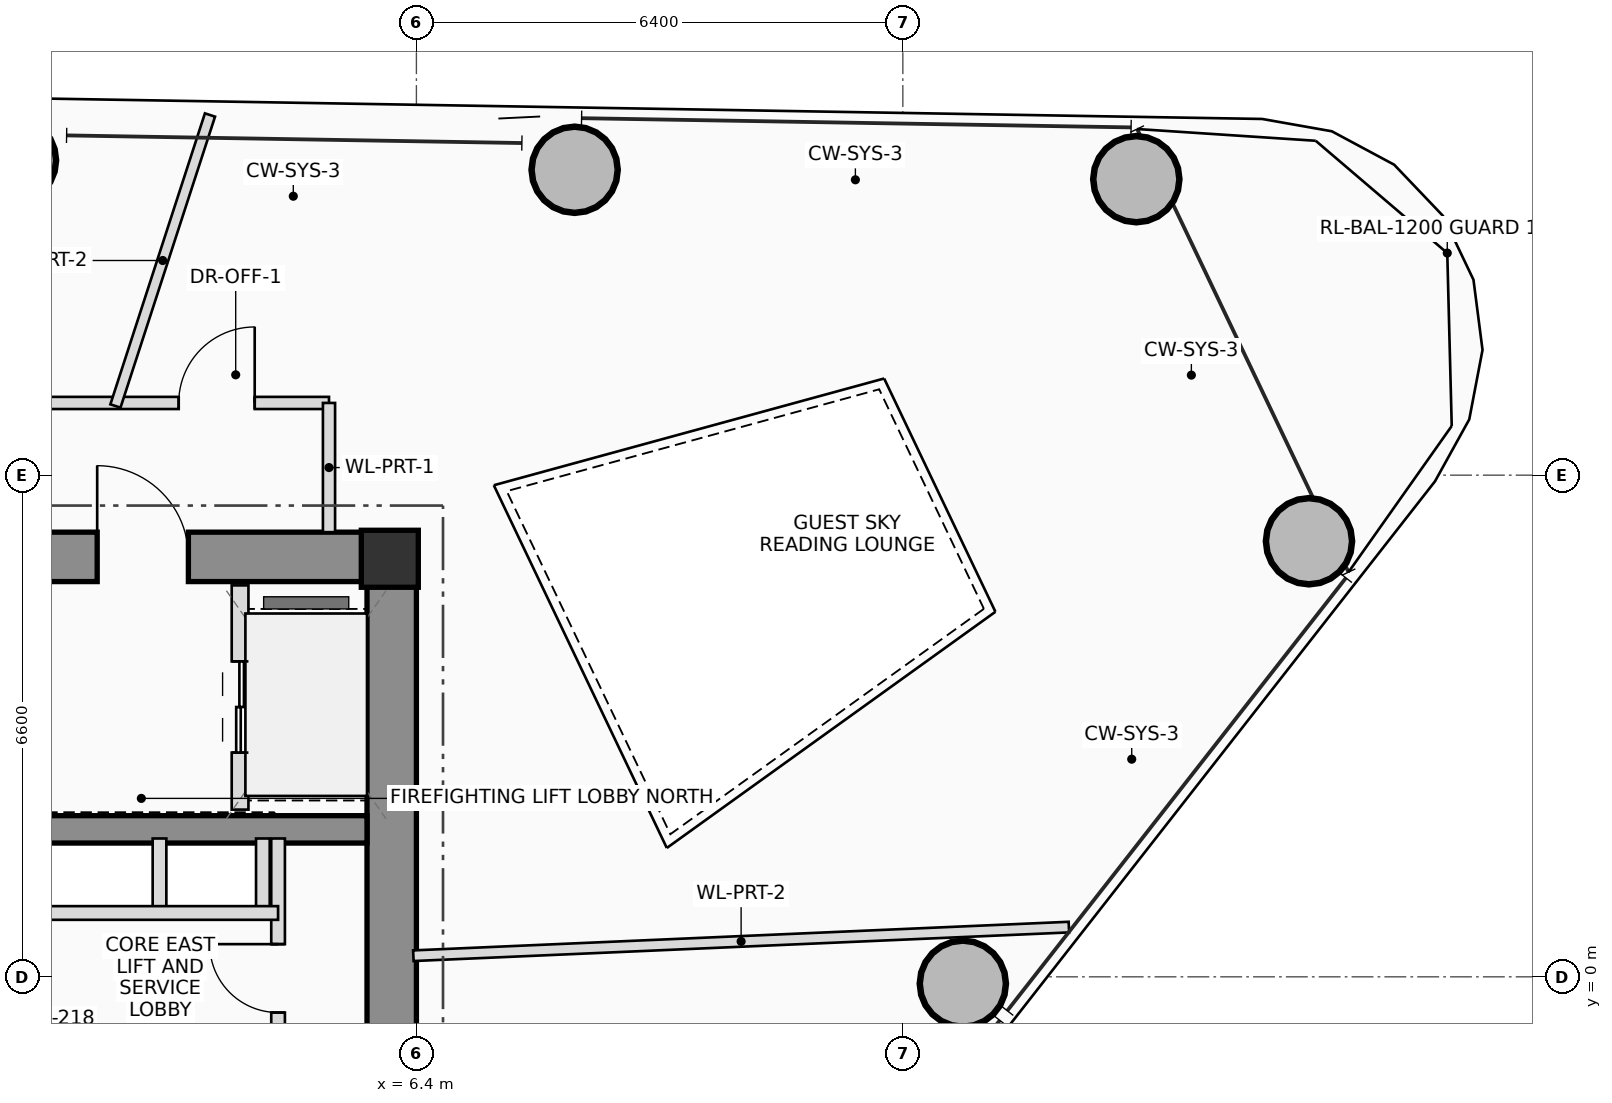
"""IFC4 building model, lengths in metres.
Left out: names, types, materials, properties, quantities, classifications, styles, units other than length and angle.
Written with IfcOpenShell. Run it as: python <this file> out.ifc"""

import sys

from ifc_helpers import new_model, si_unit, direction, frame, frame_2d, origin, origin_2d, place, context, subcontext, project, spatial, rectangle, hollow_circle, extrude, source, transform, mapped, element, fill, save


model = new_model("IFC4")
c1 = context("Model", 3, precision=1e-05, world=origin(), true_north=direction((0.0, 1.0)))
c2 = subcontext(c1, "Body", "Model", "MODEL_VIEW")
j1 = project(units=[si_unit("LENGTHUNIT", "METRE"), si_unit("PLANEANGLEUNIT", "RADIAN")], contexts=[c1])
p1 = place(None, origin())
s1 = spatial("IfcSite", under=j1, at=p1, CompositionType="ELEMENT")
p2 = place(p1, origin())
s2 = spatial("IfcBuilding", under=s1, at=p2, CompositionType="ELEMENT")
p3 = place(p2, frame((0.0, 0.0, 201.8)))
s3 = spatial("IfcBuildingStorey", under=s2, at=p3, CompositionType="ELEMENT", Elevation=201.8)
m1 = source(origin(), c2, "Body", "SweptSolid", [
    extrude(rectangle(XDim=0.75, YDim=0.75, at=origin_2d()), origin(), (0.0, 0.0, 1.0), 3.45),
])
p4 = place(p3, frame((6.05, 5.5, 0.0), z_axis=(0.0, 0.0, 1.0), x_axis=(1.0, 0.0, 0.0)))
e1 = element("IfcColumn", 1, at=p4, inside=s3, PredefinedType="COLUMN", context=c2, shape_type="MappedRepresentation", body=[
    mapped(m1, transform((0.0, 0.0, 0.0), scale=1.0)),
])
p5 = place(p3, frame((-6.4, 5.525, 0.0), z_axis=(0.0, 0.0, 1.0), x_axis=(1.0, 0.0, 0.0)))
e2 = element("IfcWall", 2, at=p5, inside=s3, PredefinedType="SHEAR", context=c2, shape_type="SweptSolid", body=[
    extrude(rectangle(XDim=12.8, YDim=0.65, at=frame_2d((6.4, 0.0))), origin(), (0.0, 0.0, 1.0), 3.45),
])
p6 = place(p5, frame((8.6, 0.0, 0.0)))
e3 = element("IfcOpeningElement", 3, at=p6, cuts=e2, PredefinedType="OPENING", context=c2, shape_type="SweptSolid", body=[
    extrude(rectangle(XDim=1.2, YDim=2.2, at=frame_2d((0.6, 1.1))), frame((0.0, 0.335, 0.0), z_axis=(0.0, -1.0, 0.0), x_axis=(1.0, 0.0, 0.0)), (0.0, 0.0, 1.0), 0.67),
])
p7 = place(p3, frame((6.075, -5.2, 0.0), z_axis=(0.0, 0.0, 1.0), x_axis=(0.0, 1.0, 0.0)))
e4 = element("IfcWall", 4, at=p7, inside=s3, PredefinedType="SHEAR", context=c2, shape_type="SweptSolid", body=[
    extrude(rectangle(XDim=10.4, YDim=0.65, at=frame_2d((5.2, 0.0))), origin(), (0.0, 0.0, 1.0), 3.45),
])
p8 = place(p3, frame((-5.75, 1.94, 0.0), z_axis=(0.0, 0.0, 1.0), x_axis=(1.0, 0.0, 0.0)))
e5 = element("IfcWall", 5, at=p8, inside=s3, PredefinedType="SHEAR", context=c2, shape_type="SweptSolid", body=[
    extrude(rectangle(XDim=11.5, YDim=0.36, at=frame_2d((5.75, 0.0))), origin(), (0.0, 0.0, 1.0), 3.45),
])
m2 = source(origin(), c2, "Body", "SweptSolid", [
    extrude(hollow_circle(Radius=0.575, WallThickness=0.042, at=origin_2d()), origin(), (0.0, 0.0, 1.0), 3.45),
])
for number, where, z_axis, x_axis in (
    (6, (13.59, -0.09, 0.0), (0.0, 0.0, 1.0), (1.0, 0.0, 0.0)),
    (7, (18.144, 5.731, 0.0), (0.0, 0.0, 1.0), (1.0, 0.0, 0.0)),
    (8, (15.872, 10.494, 0.0), (0.0, 0.0, 1.0), (1.0, 0.0, 0.0)),
    (9, (8.482, 10.618, 0.0), (0.0, 0.0, 1.0), (1.0, 0.0, 0.0)),
    (10, (1.092, 10.742, 0.0), (0.0, 0.0, 1.0), (1.0, 0.0, 0.0)),
):
    element("IfcColumn", number, at=place(p3, frame(where, z_axis=z_axis, x_axis=x_axis)), inside=s3, PredefinedType="COLUMN", context=c2, shape_type="MappedRepresentation", body=[
        mapped(m2, transform((0.0, 0.0, 0.0), scale=1.0)),
    ])
p9 = place(p3, frame((4.08, 2.2, 0.0), z_axis=(0.0, 0.0, 1.0), x_axis=(0.0, 1.0, 0.0)))
e11 = element("IfcWall", 11, at=p9, inside=s3, PredefinedType="PLUMBINGWALL", context=c2, shape_type="SweptSolid", body=[
    extrude(rectangle(XDim=2.95, YDim=0.22, at=frame_2d((1.475, 0.0))), origin(), (0.0, 0.0, 1.0), 3.25),
])
p10 = place(p9, frame((0.75, 0.0, 0.0)))
e12 = element("IfcOpeningElement", 12, at=p10, cuts=e11, PredefinedType="OPENING", context=c2, shape_type="SweptSolid", body=[
    extrude(rectangle(XDim=1.2, YDim=2.25, at=frame_2d((0.6, 1.125))), frame((0.0, 0.12, 0.0), z_axis=(0.0, -1.0, 0.0), x_axis=(1.0, 0.0, 0.0)), (0.0, 0.0, 1.0), 0.24),
])
for number, where, z_axis, x_axis in (
    (13, (3.02, 0.84, 0.0), (0.0, 0.0, 1.0), (0.0, 1.0, 0.0)),
    (14, (4.38, 0.84, 0.0), (0.0, 0.0, 1.0), (0.0, 1.0, 0.0)),
):
    element("IfcWall", number, at=place(p3, frame(where, z_axis=z_axis, x_axis=x_axis)), inside=s3, PredefinedType="PLUMBINGWALL", context=c2, shape_type="SweptSolid", body=[
        extrude(rectangle(XDim=0.98, YDim=0.18, at=frame_2d((0.49, 0.0))), origin(), (0.0, 0.0, 1.0), 3.25),
    ])
p11 = place(p3, frame((4.58, -1.82, 0.0), z_axis=(0.0, 0.0, 1.0), x_axis=(0.0, 1.0, 0.0)))
e15 = element("IfcWall", 15, at=p11, inside=s3, PredefinedType="PLUMBINGWALL", context=c2, shape_type="SweptSolid", body=[
    extrude(rectangle(XDim=3.64, YDim=0.18, at=frame_2d((1.82, 0.0))), origin(), (0.0, 0.0, 1.0), 3.25),
])
p12 = place(p11, frame((1.35, 0.0, 0.0)))
e16 = element("IfcOpeningElement", 16, at=p12, cuts=e15, PredefinedType="OPENING", context=c2, shape_type="SweptSolid", body=[
    extrude(rectangle(XDim=0.9, YDim=2.05, at=frame_2d((0.45, 1.025))), frame((0.0, 0.1, 0.0), z_axis=(0.0, -1.0, 0.0), x_axis=(1.0, 0.0, 0.0)), (0.0, 0.0, 1.0), 0.2),
])
p13 = place(p3, frame((-5.68, 0.84, 0.0), z_axis=(0.0, 0.0, 1.0), x_axis=(1.0, 0.0, 0.0)))
e17 = element("IfcWall", 17, at=p13, inside=s3, PredefinedType="PLUMBINGWALL", context=c2, shape_type="SweptSolid", body=[
    extrude(rectangle(XDim=10.26, YDim=0.18, at=frame_2d((5.13, 0.0))), origin(), (0.0, 0.0, 1.0), 3.25),
])
p14 = place(p13, frame((1.08, 0.0, 0.0)))
e18 = element("IfcOpeningElement", 18, at=p14, cuts=e17, PredefinedType="OPENING", context=c2, shape_type="SweptSolid", body=[
    extrude(rectangle(XDim=0.9, YDim=2.05, at=frame_2d((0.45, 1.025))), frame((0.0, 0.1, 0.0), z_axis=(0.0, -1.0, 0.0), x_axis=(1.0, 0.0, 0.0)), (0.0, 0.0, 1.0), 0.2),
])
p15 = place(p13, frame((3.93, 0.0, 0.0)))
e19 = element("IfcOpeningElement", 19, at=p15, cuts=e17, PredefinedType="OPENING", context=c2, shape_type="SweptSolid", body=[
    extrude(rectangle(XDim=1.1, YDim=2.2, at=frame_2d((0.55, 1.1))), frame((0.0, 0.1, 0.0), z_axis=(0.0, -1.0, 0.0), x_axis=(1.0, 0.0, 0.0)), (0.0, 0.0, 1.0), 0.2),
])
p16 = place(p13, frame((5.63, 0.0, 0.0)))
e20 = element("IfcOpeningElement", 20, at=p16, cuts=e17, PredefinedType="OPENING", context=c2, shape_type="SweptSolid", body=[
    extrude(rectangle(XDim=1.1, YDim=2.2, at=frame_2d((0.55, 1.1))), frame((0.0, 0.1, 0.0), z_axis=(0.0, -1.0, 0.0), x_axis=(1.0, 0.0, 0.0)), (0.0, 0.0, 1.0), 0.2),
])
p17 = place(p3, frame((-6.36, 7.55, 0.0), z_axis=(0.0, 0.0, 1.0), x_axis=(1.0, 0.0, 0.0)))
e21 = element("IfcWall", 21, at=p17, inside=s3, PredefinedType="PARTITIONING", context=c2, shape_type="SweptSolid", body=[
    extrude(rectangle(XDim=11.61, YDim=0.16, at=frame_2d((5.805, 0.0))), origin(), (0.0, 0.0, 1.0), 2.605),
])
p18 = place(p17, frame((5.985, 0.0, 0.0)))
e22 = element("IfcOpeningElement", 22, at=p18, cuts=e21, PredefinedType="OPENING", context=c2, shape_type="SweptSolid", body=[
    extrude(rectangle(XDim=1.0, YDim=2.25, at=frame_2d((0.5, 1.125))), frame((0.0, 0.09, 0.0), z_axis=(0.0, -1.0, 0.0), x_axis=(1.0, 0.0, 0.0)), (0.0, 0.0, 1.0), 0.18),
])
p19 = place(p17, frame((9.633, 0.0, 0.0)))
e23 = element("IfcOpeningElement", 23, at=p19, cuts=e21, PredefinedType="OPENING", context=c2, shape_type="SweptSolid", body=[
    extrude(rectangle(XDim=1.0, YDim=2.25, at=frame_2d((0.5, 1.125))), frame((0.0, 0.09, 0.0), z_axis=(0.0, -1.0, 0.0), x_axis=(1.0, 0.0, 0.0)), (0.0, 0.0, 1.0), 0.18),
])
p20 = place(p3, frame((5.25, 7.55, 0.0), z_axis=(0.0, 0.0, 1.0), x_axis=(0.0, -1.0, 0.0)))
e24 = element("IfcWall", 24, at=p20, inside=s3, PredefinedType="PARTITIONING", context=c2, shape_type="SweptSolid", body=[
    extrude(rectangle(XDim=1.7, YDim=0.16, at=frame_2d((0.85, 0.0))), origin(), (0.0, 0.0, 1.0), 2.605),
])
p21 = place(p3, frame((6.36, 0.278, 0.0), z_axis=(0.0, 0.0, 1.0), x_axis=(0.999047440648, 0.043637270025, 0.0)))
e25 = element("IfcWall", 25, at=p21, inside=s3, PredefinedType="PARTITIONING", context=c2, shape_type="SweptSolid", body=[
    extrude(rectangle(XDim=8.633, YDim=0.14, at=frame_2d((4.316, 0.0))), origin(), (0.0, 0.0, 1.0), 2.605),
])
p22 = place(p3, frame((2.44, 7.51, 0.0), z_axis=(0.0, 0.0, 1.0), x_axis=(0.309013387048, 0.951057688379, 0.0)))
e26 = element("IfcWall", 26, at=p22, inside=s3, PredefinedType="PARTITIONING", context=c2, shape_type="SweptSolid", body=[
    extrude(rectangle(XDim=4.025, YDim=0.14, at=frame_2d((2.013, 0.0))), origin(), (0.0, 0.0, 1.0), 2.605),
])
p23 = place(p6, origin())
e27 = element("IfcDoor", 27, at=p23, inside=s3, OperationType="SINGLE_SWING_LEFT", PredefinedType="DOOR", context=c2, shape_type="SweptSolid", body=[
    extrude(rectangle(XDim=1.2, YDim=2.2, at=frame_2d((0.6, 1.1))), frame((0.0, 0.025, 0.0), z_axis=(0.0, -1.0, 0.0), x_axis=(1.0, 0.0, 0.0)), (0.0, 0.0, 1.0), 0.05),
])
fill(e3, e27)
p24 = place(p10, origin())
e28 = element("IfcDoor", 28, at=p24, inside=s3, OperationType="DOUBLE_DOOR_SLIDING", PredefinedType="DOOR", context=c2, shape_type="SweptSolid", body=[
    extrude(rectangle(XDim=1.2, YDim=2.25, at=frame_2d((0.6, 1.125))), frame((0.0, 0.025, 0.0), z_axis=(0.0, -1.0, 0.0), x_axis=(1.0, 0.0, 0.0)), (0.0, 0.0, 1.0), 0.05),
])
fill(e12, e28)
p25 = place(p12, origin())
e29 = element("IfcDoor", 29, at=p25, inside=s3, OperationType="SINGLE_SWING_RIGHT", PredefinedType="DOOR", context=c2, shape_type="SweptSolid", body=[
    extrude(rectangle(XDim=0.9, YDim=2.05, at=frame_2d((0.45, 1.025))), frame((0.0, 0.025, 0.0), z_axis=(0.0, -1.0, 0.0), x_axis=(1.0, 0.0, 0.0)), (0.0, 0.0, 1.0), 0.05),
])
fill(e16, e29)
p26 = place(p19, origin())
e30 = element("IfcDoor", 30, at=p26, inside=s3, OperationType="SINGLE_SWING_RIGHT", PredefinedType="DOOR", context=c2, shape_type="SweptSolid", body=[
    extrude(rectangle(XDim=1.0, YDim=2.25, at=frame_2d((0.5, 1.125))), frame((0.0, 0.025, 0.0), z_axis=(0.0, -1.0, 0.0), x_axis=(1.0, 0.0, 0.0)), (0.0, 0.0, 1.0), 0.05),
])
fill(e23, e30)
save(model, sys.argv[1])
